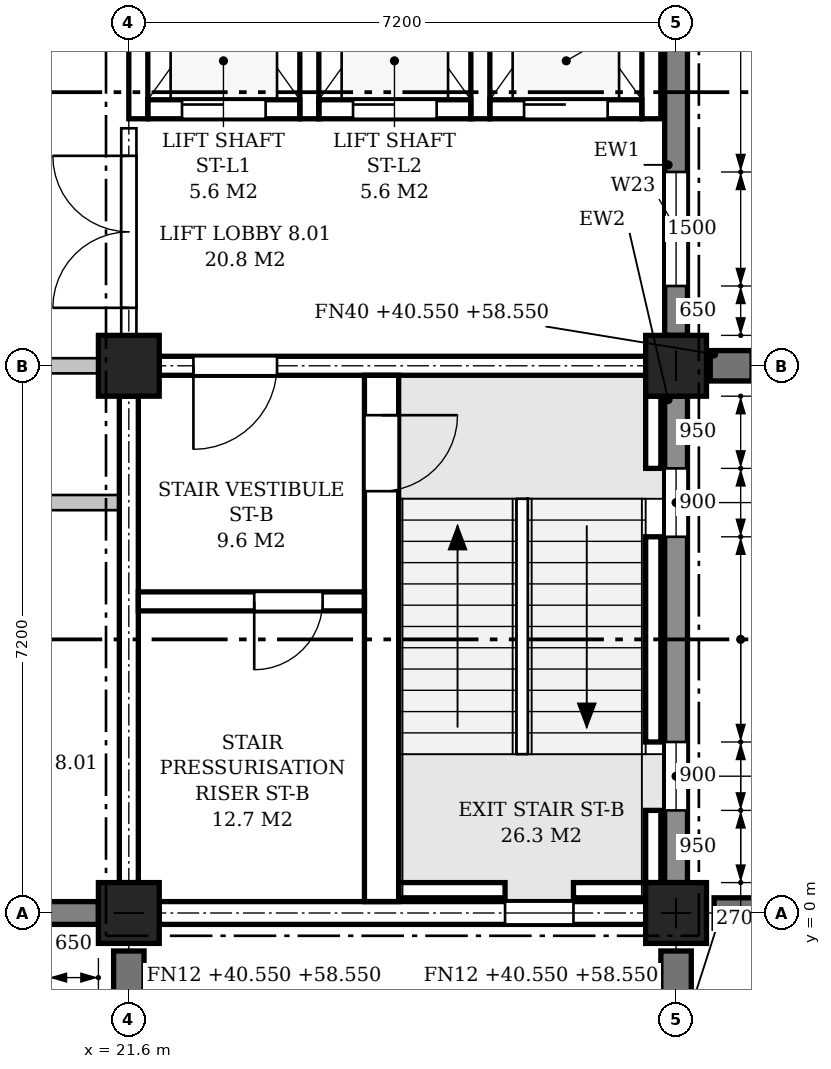
"""IFC4 building model, lengths in metres.
Left out: names, types, materials, properties, quantities, classifications, styles, units other than length and angle.
Written with IfcOpenShell. Run it as: python <this file> out.ifc"""

import sys

from ifc_helpers import new_model, si_unit, direction, frame, frame_2d, origin, origin_2d, place, context, subcontext, project, spatial, polyline, rectangle, outline, extrude, element, fill, save


model = new_model("IFC4")
c1 = context("Model", 3, precision=1e-05, world=origin(), true_north=direction((0.0, 1.0)))
c2 = subcontext(c1, "Body", "Model", "MODEL_VIEW")
j1 = project(units=[si_unit("LENGTHUNIT", "METRE"), si_unit("PLANEANGLEUNIT", "RADIAN")], contexts=[c1])
p1 = place(None, origin())
s1 = spatial("IfcSite", under=j1, at=p1, CompositionType="ELEMENT")
p2 = place(p1, origin())
s2 = spatial("IfcBuilding", under=s1, at=p2, CompositionType="ELEMENT")
p3 = place(p2, frame((0.0, 0.0, 40.8)))
s3 = spatial("IfcBuildingStorey", under=s2, at=p3, CompositionType="ELEMENT", Elevation=40.8)
for number, where, z_axis, x_axis in (
    (1, (21.6, 0.0, 0.0), (0.0, 0.0, 1.0), (1.0, 0.0, 0.0)),
    (2, (21.6, 7.2, 0.0), (0.0, 0.0, 1.0), (1.0, 0.0, 0.0)),
    (3, (28.8, 0.0, 0.0), (0.0, 0.0, 1.0), (1.0, 0.0, 0.0)),
    (4, (28.8, 7.2, 0.0), (0.0, 0.0, 1.0), (1.0, 0.0, 0.0)),
):
    element("IfcColumn", number, at=place(p3, frame(where, z_axis=z_axis, x_axis=x_axis)), inside=s3, PredefinedType="COLUMN", context=c2, shape_type="SweptSolid", body=[
        extrude(rectangle(XDim=0.8, YDim=0.8, at=origin_2d()), origin(), (0.0, 0.0, 1.0), 4.5),
    ])
p4 = place(p3, frame((14.8, 0.0, 0.0), z_axis=(0.0, 0.0, 1.0), x_axis=(1.0, 0.0, 0.0)))
e5 = element("IfcWall", 5, at=p4, inside=s3, PredefinedType="STANDARD", context=c2, shape_type="SweptSolid", body=[
    extrude(rectangle(XDim=6.4, YDim=0.3, at=frame_2d((3.2, 0.0))), origin(), (0.0, 0.0, 1.0), 3.65),
])
p5 = place(p4, frame((0.65, 0.0, 0.9)))
e6 = element("IfcOpeningElement", 6, at=p5, cuts=e5, PredefinedType="OPENING", context=c2, shape_type="SweptSolid", body=[
    extrude(outline(polyline([(0.0, 0.0), (1.5, 0.0), (1.5, 1.95), (0.75, 2.7), (0.0, 1.95), (0.0, 0.0)])), frame((0.0, 0.16, 0.0), z_axis=(0.0, -1.0, 0.0), x_axis=(1.0, 0.0, 0.0)), (0.0, 0.0, 1.0), 0.32),
])
p6 = place(p4, frame((4.25, 0.0, 0.9)))
e7 = element("IfcOpeningElement", 7, at=p6, cuts=e5, PredefinedType="OPENING", context=c2, shape_type="SweptSolid", body=[
    extrude(outline(polyline([(0.0, 0.0), (1.5, 0.0), (1.5, 1.95), (0.75, 2.7), (0.0, 1.95), (0.0, 0.0)])), frame((0.0, 0.16, 0.0), z_axis=(0.0, -1.0, 0.0), x_axis=(1.0, 0.0, 0.0)), (0.0, 0.0, 1.0), 0.32),
])
p7 = place(p3, frame((22.0, 0.0, 0.0), z_axis=(0.0, 0.0, 1.0), x_axis=(1.0, 0.0, 0.0)))
e8 = element("IfcWall", 8, at=p7, inside=s3, PredefinedType="STANDARD", context=c2, shape_type="SweptSolid", body=[
    extrude(rectangle(XDim=6.4, YDim=0.3, at=frame_2d((3.2, 0.0))), origin(), (0.0, 0.0, 1.0), 3.65),
])
p8 = place(p7, frame((4.55, 0.0, 0.9)))
e9 = element("IfcOpeningElement", 9, at=p8, cuts=e8, PredefinedType="OPENING", context=c2, shape_type="SweptSolid", body=[
    extrude(outline(polyline([(0.0, 0.0), (0.9, 0.0), (0.9, 2.25), (0.45, 2.7), (0.0, 2.25), (0.0, 0.0)])), frame((0.0, 0.16, 0.0), z_axis=(0.0, -1.0, 0.0), x_axis=(1.0, 0.0, 0.0)), (0.0, 0.0, 1.0), 0.32),
])
p9 = place(p3, frame((28.8, 0.4, 0.0), z_axis=(0.0, 0.0, 1.0), x_axis=(0.0, 1.0, 0.0)))
e10 = element("IfcWall", 10, at=p9, inside=s3, PredefinedType="STANDARD", context=c2, shape_type="SweptSolid", body=[
    extrude(rectangle(XDim=6.4, YDim=0.3, at=frame_2d((3.2, 0.0))), origin(), (0.0, 0.0, 1.0), 3.65),
])
p10 = place(p9, frame((0.95, 0.0, 0.9)))
e11 = element("IfcOpeningElement", 11, at=p10, cuts=e10, PredefinedType="OPENING", context=c2, shape_type="SweptSolid", body=[
    extrude(outline(polyline([(0.0, 0.0), (0.9, 0.0), (0.9, 2.25), (0.45, 2.7), (0.0, 2.25), (0.0, 0.0)])), frame((0.0, 0.16, 0.0), z_axis=(0.0, -1.0, 0.0), x_axis=(1.0, 0.0, 0.0)), (0.0, 0.0, 1.0), 0.32),
])
p11 = place(p9, frame((4.55, 0.0, 0.9)))
e12 = element("IfcOpeningElement", 12, at=p11, cuts=e10, PredefinedType="OPENING", context=c2, shape_type="SweptSolid", body=[
    extrude(outline(polyline([(0.0, 0.0), (0.9, 0.0), (0.9, 2.25), (0.45, 2.7), (0.0, 2.25), (0.0, 0.0)])), frame((0.0, 0.16, 0.0), z_axis=(0.0, -1.0, 0.0), x_axis=(1.0, 0.0, 0.0)), (0.0, 0.0, 1.0), 0.32),
])
p12 = place(p3, frame((28.8, 7.6, 0.0), z_axis=(0.0, 0.0, 1.0), x_axis=(0.0, 1.0, 0.0)))
e13 = element("IfcWall", 13, at=p12, inside=s3, PredefinedType="STANDARD", context=c2, shape_type="SweptSolid", body=[
    extrude(rectangle(XDim=6.4, YDim=0.3, at=frame_2d((3.2, 0.0))), origin(), (0.0, 0.0, 1.0), 3.65),
])
p13 = place(p12, frame((0.65, 0.0, 0.9)))
e14 = element("IfcOpeningElement", 14, at=p13, cuts=e13, PredefinedType="OPENING", context=c2, shape_type="SweptSolid", body=[
    extrude(outline(polyline([(0.0, 0.0), (1.5, 0.0), (1.5, 1.95), (0.75, 2.7), (0.0, 1.95), (0.0, 0.0)])), frame((0.0, 0.16, 0.0), z_axis=(0.0, -1.0, 0.0), x_axis=(1.0, 0.0, 0.0)), (0.0, 0.0, 1.0), 0.32),
])
for number, where, z_axis, x_axis in (
    (15, (21.6, -0.5, -0.25), (0.0, 0.0, 1.0), (0.0, -1.0, 0.0)),
    (16, (28.8, -0.5, -0.25), (0.0, 0.0, 1.0), (0.0, -1.0, 0.0)),
):
    element("IfcWall", number, at=place(p3, frame(where, z_axis=z_axis, x_axis=x_axis)), inside=s3, PredefinedType="POLYGONAL", context=c2, shape_type="SweptSolid", body=[
        extrude(outline(polyline([(0.65, 0.0), (0.65, 17.775), (0.5, 18.0), (0.0, 18.0), (0.0, 0.0), (0.65, 0.0)])), frame((0.0, 0.2, 0.0), z_axis=(0.0, -1.0, 0.0), x_axis=(1.0, 0.0, 0.0)), (0.0, 0.0, 1.0), 0.4),
    ])
for number, where, z_axis, x_axis in (
    (17, (29.3, 0.0, -0.25), (0.0, 0.0, 1.0), (1.0, 0.0, 0.0)),
    (18, (29.25, 7.2, -0.25), (0.0, 0.0, 1.0), (1.0, 0.0, 0.0)),
):
    element("IfcWall", number, at=place(p3, frame(where, z_axis=z_axis, x_axis=x_axis)), inside=s3, PredefinedType="POLYGONAL", context=c2, shape_type="SweptSolid", body=[
        extrude(outline(polyline([(0.55, 0.0), (0.55, 17.925), (0.5, 18.0), (0.0, 18.0), (0.0, 0.0), (0.55, 0.0)])), frame((0.0, 0.2, 0.0), z_axis=(0.0, -1.0, 0.0), x_axis=(1.0, 0.0, 0.0)), (0.0, 0.0, 1.0), 0.4),
    ])
p14 = place(p3, frame((22.0, 7.2, 0.0), z_axis=(0.0, 0.0, 1.0), x_axis=(1.0, 0.0, 0.0)))
e19 = element("IfcWall", 19, at=p14, inside=s3, PredefinedType="SHEAR", context=c2, shape_type="SweptSolid", body=[
    extrude(rectangle(XDim=6.4, YDim=0.25, at=frame_2d((3.2, 0.0))), origin(), (0.0, 0.0, 1.0), 3.55),
])
p15 = place(p14, frame((0.45, 0.0, 0.0)))
e20 = element("IfcOpeningElement", 20, at=p15, cuts=e19, PredefinedType="OPENING", context=c2, shape_type="SweptSolid", body=[
    extrude(rectangle(XDim=1.1, YDim=2.1, at=frame_2d((0.55, 1.05))), frame((0.0, 0.135, 0.0), z_axis=(0.0, -1.0, 0.0), x_axis=(1.0, 0.0, 0.0)), (0.0, 0.0, 1.0), 0.27),
])
p16 = place(p3, frame((21.6, 0.4, 0.0), z_axis=(0.0, 0.0, 1.0), x_axis=(0.0, 1.0, 0.0)))
e21 = element("IfcWall", 21, at=p16, inside=s3, PredefinedType="SHEAR", context=c2, shape_type="SweptSolid", body=[
    extrude(rectangle(XDim=6.4, YDim=0.25, at=frame_2d((3.2, 0.0))), origin(), (0.0, 0.0, 1.0), 3.55),
])
p17 = place(p3, frame((28.5, 0.4, -0.25), z_axis=(0.0, 0.0, 1.0), x_axis=(0.0, 1.0, 0.0)))
e22 = element("IfcWall", 22, at=p17, inside=s3, PredefinedType="SHEAR", context=c2, shape_type="SweptSolid", body=[
    extrude(rectangle(XDim=0.95, YDim=0.2, at=frame_2d((0.475, 0.0))), origin(), (0.0, 0.0, 1.0), 4.5),
])
p18 = place(p3, frame((28.5, 2.25, -0.25), z_axis=(0.0, 0.0, 1.0), x_axis=(0.0, 1.0, 0.0)))
e23 = element("IfcWall", 23, at=p18, inside=s3, PredefinedType="SHEAR", context=c2, shape_type="SweptSolid", body=[
    extrude(rectangle(XDim=2.7, YDim=0.2, at=frame_2d((1.35, 0.0))), origin(), (0.0, 0.0, 1.0), 4.5),
])
p19 = place(p3, frame((28.5, 5.85, -0.25), z_axis=(0.0, 0.0, 1.0), x_axis=(0.0, 1.0, 0.0)))
e24 = element("IfcWall", 24, at=p19, inside=s3, PredefinedType="SHEAR", context=c2, shape_type="SweptSolid", body=[
    extrude(rectangle(XDim=0.95, YDim=0.2, at=frame_2d((0.475, 0.0))), origin(), (0.0, 0.0, 1.0), 4.5),
])
p20 = place(p3, frame((25.15, 0.3, -0.25), z_axis=(0.0, 0.0, 1.0), x_axis=(1.0, 0.0, 0.0)))
e25 = element("IfcWall", 25, at=p20, inside=s3, PredefinedType="SHEAR", context=c2, shape_type="SweptSolid", body=[
    extrude(rectangle(XDim=1.4, YDim=0.2, at=frame_2d((0.7, 0.0))), origin(), (0.0, 0.0, 1.0), 4.5),
])
p21 = place(p3, frame((27.45, 0.3, -0.25), z_axis=(0.0, 0.0, 1.0), x_axis=(1.0, 0.0, 0.0)))
e26 = element("IfcWall", 26, at=p21, inside=s3, PredefinedType="SHEAR", context=c2, shape_type="SweptSolid", body=[
    extrude(rectangle(XDim=0.95, YDim=0.2, at=frame_2d((0.475, 0.0))), origin(), (0.0, 0.0, 1.0), 4.5),
])
p22 = place(p3, frame((24.925, 0.15, 0.0), z_axis=(0.0, 0.0, 1.0), x_axis=(0.0, 1.0, 0.0)))
e27 = element("IfcWall", 27, at=p22, inside=s3, PredefinedType="SHEAR", context=c2, shape_type="SweptSolid", body=[
    extrude(rectangle(XDim=6.925, YDim=0.45, at=frame_2d((3.462, 0.0))), origin(), (0.0, 0.0, 1.0), 4.25),
])
p23 = place(p22, frame((5.4, 0.0, 0.0)))
e28 = element("IfcOpeningElement", 28, at=p23, cuts=e27, PredefinedType="OPENING", context=c2, shape_type="SweptSolid", body=[
    extrude(rectangle(XDim=1.0, YDim=2.1, at=frame_2d((0.5, 1.05))), frame((0.0, 0.235, 0.0), z_axis=(0.0, -1.0, 0.0), x_axis=(1.0, 0.0, 0.0)), (0.0, 0.0, 1.0), 0.47),
])
p24 = place(p3, frame((21.725, 4.1, 0.0), z_axis=(0.0, 0.0, 1.0), x_axis=(1.0, 0.0, 0.0)))
e29 = element("IfcWall", 29, at=p24, inside=s3, PredefinedType="SHEAR", context=c2, shape_type="SweptSolid", body=[
    extrude(rectangle(XDim=2.975, YDim=0.25, at=frame_2d((1.487, 0.0))), origin(), (0.0, 0.0, 1.0), 4.25),
])
p25 = place(p24, frame((1.525, 0.0, 0.0)))
e30 = element("IfcOpeningElement", 30, at=p25, cuts=e29, PredefinedType="OPENING", context=c2, shape_type="SweptSolid", body=[
    extrude(rectangle(XDim=0.9, YDim=2.1, at=frame_2d((0.45, 1.05))), frame((0.0, 0.135, 0.0), z_axis=(0.0, -1.0, 0.0), x_axis=(1.0, 0.0, 0.0)), (0.0, 0.0, 1.0), 0.27),
])
p26 = place(p3, frame((21.725, 10.45, -0.25), z_axis=(0.0, 0.0, 1.0), x_axis=(0.0, 1.0, 0.0)))
e31 = element("IfcWall", 31, at=p26, inside=s3, PredefinedType="SHEAR", context=c2, shape_type="SweptSolid", body=[
    extrude(rectangle(XDim=3.55, YDim=0.25, at=frame_2d((1.775, 0.0))), origin(), (0.0, 0.0, 1.0), 3.8),
])
for number, where, z_axis, x_axis in (
    (32, (23.975, 10.45, -0.25), (0.0, 0.0, 1.0), (0.0, 1.0, 0.0)),
    (33, (26.225, 10.45, -0.25), (0.0, 0.0, 1.0), (0.0, 1.0, 0.0)),
):
    element("IfcWall", number, at=place(p3, frame(where, z_axis=z_axis, x_axis=x_axis)), inside=s3, PredefinedType="SHEAR", context=c2, shape_type="SweptSolid", body=[
        extrude(rectangle(XDim=3.3, YDim=0.25, at=frame_2d((1.65, 0.0))), origin(), (0.0, 0.0, 1.0), 4.5),
    ])
p27 = place(p3, frame((28.475, 10.45, -0.25), z_axis=(0.0, 0.0, 1.0), x_axis=(0.0, 1.0, 0.0)))
e34 = element("IfcWall", 34, at=p27, inside=s3, PredefinedType="SHEAR", context=c2, shape_type="SweptSolid", body=[
    extrude(rectangle(XDim=3.55, YDim=0.25, at=frame_2d((1.775, 0.0))), origin(), (0.0, 0.0, 1.0), 4.5),
])
p28 = place(p3, frame((21.85, 10.575, -0.25), z_axis=(0.0, 0.0, 1.0), x_axis=(1.0, 0.0, 0.0)))
e35 = element("IfcWall", 35, at=p28, inside=s3, PredefinedType="SHEAR", context=c2, shape_type="SweptSolid", body=[
    extrude(rectangle(XDim=2.0, YDim=0.25, at=frame_2d((1.0, 0.0))), origin(), (0.0, 0.0, 1.0), 4.5),
])
p29 = place(p28, frame((0.45, 0.0, 0.25)))
e36 = element("IfcOpeningElement", 36, at=p29, cuts=e35, PredefinedType="OPENING", context=c2, shape_type="SweptSolid", body=[
    extrude(rectangle(XDim=1.1, YDim=2.1, at=frame_2d((0.55, 1.05))), frame((0.0, 0.135, 0.0), z_axis=(0.0, -1.0, 0.0), x_axis=(1.0, 0.0, 0.0)), (0.0, 0.0, 1.0), 0.27),
])
p30 = place(p3, frame((24.1, 10.575, -0.25), z_axis=(0.0, 0.0, 1.0), x_axis=(1.0, 0.0, 0.0)))
e37 = element("IfcWall", 37, at=p30, inside=s3, PredefinedType="SHEAR", context=c2, shape_type="SweptSolid", body=[
    extrude(rectangle(XDim=2.0, YDim=0.25, at=frame_2d((1.0, 0.0))), origin(), (0.0, 0.0, 1.0), 4.5),
])
p31 = place(p30, frame((0.45, 0.0, 0.25)))
e38 = element("IfcOpeningElement", 38, at=p31, cuts=e37, PredefinedType="OPENING", context=c2, shape_type="SweptSolid", body=[
    extrude(rectangle(XDim=1.1, YDim=2.1, at=frame_2d((0.55, 1.05))), frame((0.0, 0.135, 0.0), z_axis=(0.0, -1.0, 0.0), x_axis=(1.0, 0.0, 0.0)), (0.0, 0.0, 1.0), 0.27),
])
p32 = place(p3, frame((26.35, 10.575, -0.25), z_axis=(0.0, 0.0, 1.0), x_axis=(1.0, 0.0, 0.0)))
e39 = element("IfcWall", 39, at=p32, inside=s3, PredefinedType="SHEAR", context=c2, shape_type="SweptSolid", body=[
    extrude(rectangle(XDim=2.0, YDim=0.25, at=frame_2d((1.0, 0.0))), origin(), (0.0, 0.0, 1.0), 4.5),
])
p33 = place(p32, frame((0.45, 0.0, 0.25)))
e40 = element("IfcOpeningElement", 40, at=p33, cuts=e39, PredefinedType="OPENING", context=c2, shape_type="SweptSolid", body=[
    extrude(rectangle(XDim=1.1, YDim=2.1, at=frame_2d((0.55, 1.05))), frame((0.0, 0.135, 0.0), z_axis=(0.0, -1.0, 0.0), x_axis=(1.0, 0.0, 0.0)), (0.0, 0.0, 1.0), 0.27),
])
p34 = place(p3, frame((7.325, 5.4, 0.0), z_axis=(0.0, 0.0, 1.0), x_axis=(1.0, 0.0, 0.0)))
e41 = element("IfcWall", 41, at=p34, inside=s3, PredefinedType="PARTITIONING", context=c2, shape_type="SweptSolid", body=[
    extrude(outline(polyline([(0.0, 0.0), (14.15, 0.0), (14.15, 3.55), (14.05, 3.55), (14.05, 4.25), (7.3, 4.25), (7.3, 3.55), (6.85, 3.55), (6.85, 4.25), (0.1, 4.25), (0.1, 3.55), (0.0, 3.55), (0.0, 0.0)])), frame((0.0, 0.1, 0.0), z_axis=(0.0, -1.0, 0.0), x_axis=(1.0, 0.0, 0.0)), (0.0, 0.0, 1.0), 0.2),
])
p35 = place(p34, frame((1.238, 0.0, 0.0)))
e42 = element("IfcOpeningElement", 42, at=p35, cuts=e41, PredefinedType="OPENING", context=c2, shape_type="SweptSolid", body=[
    extrude(rectangle(XDim=1.0, YDim=2.1, at=frame_2d((0.5, 1.05))), frame((0.0, 0.11, 0.0), z_axis=(0.0, -1.0, 0.0), x_axis=(1.0, 0.0, 0.0)), (0.0, 0.0, 1.0), 0.22),
])
p36 = place(p34, frame((4.775, 0.0, 0.0)))
e43 = element("IfcOpeningElement", 43, at=p36, cuts=e41, PredefinedType="OPENING", context=c2, shape_type="SweptSolid", body=[
    extrude(rectangle(XDim=1.0, YDim=2.1, at=frame_2d((0.5, 1.05))), frame((0.0, 0.11, 0.0), z_axis=(0.0, -1.0, 0.0), x_axis=(1.0, 0.0, 0.0)), (0.0, 0.0, 1.0), 0.22),
])
p37 = place(p34, frame((8.375, 0.0, 0.0)))
e44 = element("IfcOpeningElement", 44, at=p37, cuts=e41, PredefinedType="OPENING", context=c2, shape_type="SweptSolid", body=[
    extrude(rectangle(XDim=1.0, YDim=2.1, at=frame_2d((0.5, 1.05))), frame((0.0, 0.11, 0.0), z_axis=(0.0, -1.0, 0.0), x_axis=(1.0, 0.0, 0.0)), (0.0, 0.0, 1.0), 0.22),
])
p38 = place(p34, frame((11.913, 0.0, 0.0)))
e45 = element("IfcOpeningElement", 45, at=p38, cuts=e41, PredefinedType="OPENING", context=c2, shape_type="SweptSolid", body=[
    extrude(rectangle(XDim=1.0, YDim=2.1, at=frame_2d((0.5, 1.05))), frame((0.0, 0.11, 0.0), z_axis=(0.0, -1.0, 0.0), x_axis=(1.0, 0.0, 0.0)), (0.0, 0.0, 1.0), 0.22),
])
p39 = place(p3, frame((14.8, 7.2, 0.0), z_axis=(0.0, 0.0, 1.0), x_axis=(1.0, 0.0, 0.0)))
e46 = element("IfcWall", 46, at=p39, inside=s3, PredefinedType="PARTITIONING", context=c2, shape_type="SweptSolid", body=[
    extrude(rectangle(XDim=6.4, YDim=0.2, at=frame_2d((3.2, 0.0))), origin(), (0.0, 0.0, 1.0), 3.55),
])
p40 = place(p39, frame((4.3, 0.0, 0.0)))
e47 = element("IfcOpeningElement", 47, at=p40, cuts=e46, PredefinedType="OPENING", context=c2, shape_type="SweptSolid", body=[
    extrude(rectangle(XDim=1.0, YDim=2.1, at=frame_2d((0.5, 1.05))), frame((0.0, 0.11, 0.0), z_axis=(0.0, -1.0, 0.0), x_axis=(1.0, 0.0, 0.0)), (0.0, 0.0, 1.0), 0.22),
])
p41 = place(p3, frame((21.6, 7.6, 0.0), z_axis=(0.0, 0.0, 1.0), x_axis=(0.0, 1.0, 0.0)))
e48 = element("IfcWall", 48, at=p41, inside=s3, PredefinedType="PARTITIONING", context=c2, shape_type="SweptSolid", body=[
    extrude(rectangle(XDim=2.725, YDim=0.2, at=frame_2d((1.362, 0.0))), origin(), (0.0, 0.0, 1.0), 3.55),
])
p42 = place(p41, frame((0.362, 0.0, 0.0)))
e49 = element("IfcOpeningElement", 49, at=p42, cuts=e48, PredefinedType="OPENING", context=c2, shape_type="SweptSolid", body=[
    extrude(rectangle(XDim=2.0, YDim=2.4, at=frame_2d((1.0, 1.2))), frame((0.0, 0.11, 0.0), z_axis=(0.0, -1.0, 0.0), x_axis=(1.0, 0.0, 0.0)), (0.0, 0.0, 1.0), 0.22),
])
p43 = place(p10, origin())
e50 = element("IfcWindow", 50, at=p43, inside=s3, PartitioningType="SINGLE_PANEL", PredefinedType="WINDOW", context=c2, shape_type="SweptSolid", body=[
    extrude(outline(polyline([(0.0, 0.0), (0.9, 0.0), (0.9, 2.25), (0.45, 2.7), (0.0, 2.25), (0.0, 0.0)])), frame((0.0, 0.03, 0.0), z_axis=(0.0, -1.0, 0.0), x_axis=(1.0, 0.0, 0.0)), (0.0, 0.0, 1.0), 0.06),
])
fill(e11, e50)
p44 = place(p11, origin())
e51 = element("IfcWindow", 51, at=p44, inside=s3, PartitioningType="SINGLE_PANEL", PredefinedType="WINDOW", context=c2, shape_type="SweptSolid", body=[
    extrude(outline(polyline([(0.0, 0.0), (0.9, 0.0), (0.9, 2.25), (0.45, 2.7), (0.0, 2.25), (0.0, 0.0)])), frame((0.0, 0.03, 0.0), z_axis=(0.0, -1.0, 0.0), x_axis=(1.0, 0.0, 0.0)), (0.0, 0.0, 1.0), 0.06),
])
fill(e12, e51)
p45 = place(p13, origin())
e52 = element("IfcWindow", 52, at=p45, inside=s3, PartitioningType="SINGLE_PANEL", PredefinedType="WINDOW", context=c2, shape_type="SweptSolid", body=[
    extrude(outline(polyline([(0.0, 0.0), (1.5, 0.0), (1.5, 1.95), (0.75, 2.7), (0.0, 1.95), (0.0, 0.0)])), frame((0.0, 0.03, 0.0), z_axis=(0.0, -1.0, 0.0), x_axis=(1.0, 0.0, 0.0)), (0.0, 0.0, 1.0), 0.06),
])
fill(e14, e52)
p46 = place(p8, origin())
e53 = element("IfcWindow", 53, at=p46, inside=s3, PartitioningType="SINGLE_PANEL", PredefinedType="WINDOW", context=c2, shape_type="SweptSolid", body=[
    extrude(outline(polyline([(0.0, 0.0), (0.9, 0.0), (0.9, 2.25), (0.45, 2.7), (0.0, 2.25), (0.0, 0.0)])), frame((0.0, 0.03, 0.0), z_axis=(0.0, -1.0, 0.0), x_axis=(1.0, 0.0, 0.0)), (0.0, 0.0, 1.0), 0.06),
])
fill(e9, e53)
p47 = place(p23, frame((1.0, 0.0, 0.0), z_axis=(0.0, 0.0, 1.0), x_axis=(-1.0, 0.0, 0.0)))
e54 = element("IfcDoor", 54, at=p47, inside=s3, OperationType="SINGLE_SWING_LEFT", PredefinedType="DOOR", context=c2, shape_type="SweptSolid", body=[
    extrude(rectangle(XDim=1.0, YDim=2.1, at=frame_2d((0.5, 1.05))), frame((0.0, 0.025, 0.0), z_axis=(0.0, -1.0, 0.0), x_axis=(1.0, 0.0, 0.0)), (0.0, 0.0, 1.0), 0.05),
])
fill(e28, e54)
p48 = place(p15, frame((1.1, 0.0, 0.0), z_axis=(0.0, 0.0, 1.0), x_axis=(-1.0, 0.0, 0.0)))
e55 = element("IfcDoor", 55, at=p48, inside=s3, OperationType="SINGLE_SWING_RIGHT", PredefinedType="DOOR", context=c2, shape_type="SweptSolid", body=[
    extrude(rectangle(XDim=1.1, YDim=2.1, at=frame_2d((0.55, 1.05))), frame((0.0, 0.025, 0.0), z_axis=(0.0, -1.0, 0.0), x_axis=(1.0, 0.0, 0.0)), (0.0, 0.0, 1.0), 0.05),
])
fill(e20, e55)
p49 = place(p25, frame((0.9, 0.0, 0.0), z_axis=(0.0, 0.0, 1.0), x_axis=(-1.0, 0.0, 0.0)))
e56 = element("IfcDoor", 56, at=p49, inside=s3, OperationType="SINGLE_SWING_RIGHT", PredefinedType="DOOR", context=c2, shape_type="SweptSolid", body=[
    extrude(rectangle(XDim=0.9, YDim=2.1, at=frame_2d((0.45, 1.05))), frame((0.0, 0.025, 0.0), z_axis=(0.0, -1.0, 0.0), x_axis=(1.0, 0.0, 0.0)), (0.0, 0.0, 1.0), 0.05),
])
fill(e30, e56)
p50 = place(p29, origin())
e57 = element("IfcDoor", 57, at=p50, inside=s3, OperationType="SLIDING_TO_LEFT", PredefinedType="DOOR", context=c2, shape_type="SweptSolid", body=[
    extrude(rectangle(XDim=1.1, YDim=2.1, at=frame_2d((0.55, 1.05))), frame((0.0, 0.025, 0.0), z_axis=(0.0, -1.0, 0.0), x_axis=(1.0, 0.0, 0.0)), (0.0, 0.0, 1.0), 0.05),
])
fill(e36, e57)
p51 = place(p31, origin())
e58 = element("IfcDoor", 58, at=p51, inside=s3, OperationType="SLIDING_TO_LEFT", PredefinedType="DOOR", context=c2, shape_type="SweptSolid", body=[
    extrude(rectangle(XDim=1.1, YDim=2.1, at=frame_2d((0.55, 1.05))), frame((0.0, 0.025, 0.0), z_axis=(0.0, -1.0, 0.0), x_axis=(1.0, 0.0, 0.0)), (0.0, 0.0, 1.0), 0.05),
])
fill(e38, e58)
p52 = place(p33, origin())
e59 = element("IfcDoor", 59, at=p52, inside=s3, OperationType="SLIDING_TO_LEFT", PredefinedType="DOOR", context=c2, shape_type="SweptSolid", body=[
    extrude(rectangle(XDim=1.1, YDim=2.1, at=frame_2d((0.55, 1.05))), frame((0.0, 0.025, 0.0), z_axis=(0.0, -1.0, 0.0), x_axis=(1.0, 0.0, 0.0)), (0.0, 0.0, 1.0), 0.05),
])
fill(e40, e59)
p53 = place(p42, origin())
e60 = element("IfcDoor", 60, at=p53, inside=s3, OperationType="DOUBLE_DOOR_SINGLE_SWING", PredefinedType="DOOR", context=c2, shape_type="SweptSolid", body=[
    extrude(rectangle(XDim=2.0, YDim=2.4, at=frame_2d((1.0, 1.2))), frame((0.0, 0.025, 0.0), z_axis=(0.0, -1.0, 0.0), x_axis=(1.0, 0.0, 0.0)), (0.0, 0.0, 1.0), 0.05),
])
fill(e49, e60)
save(model, sys.argv[1])
